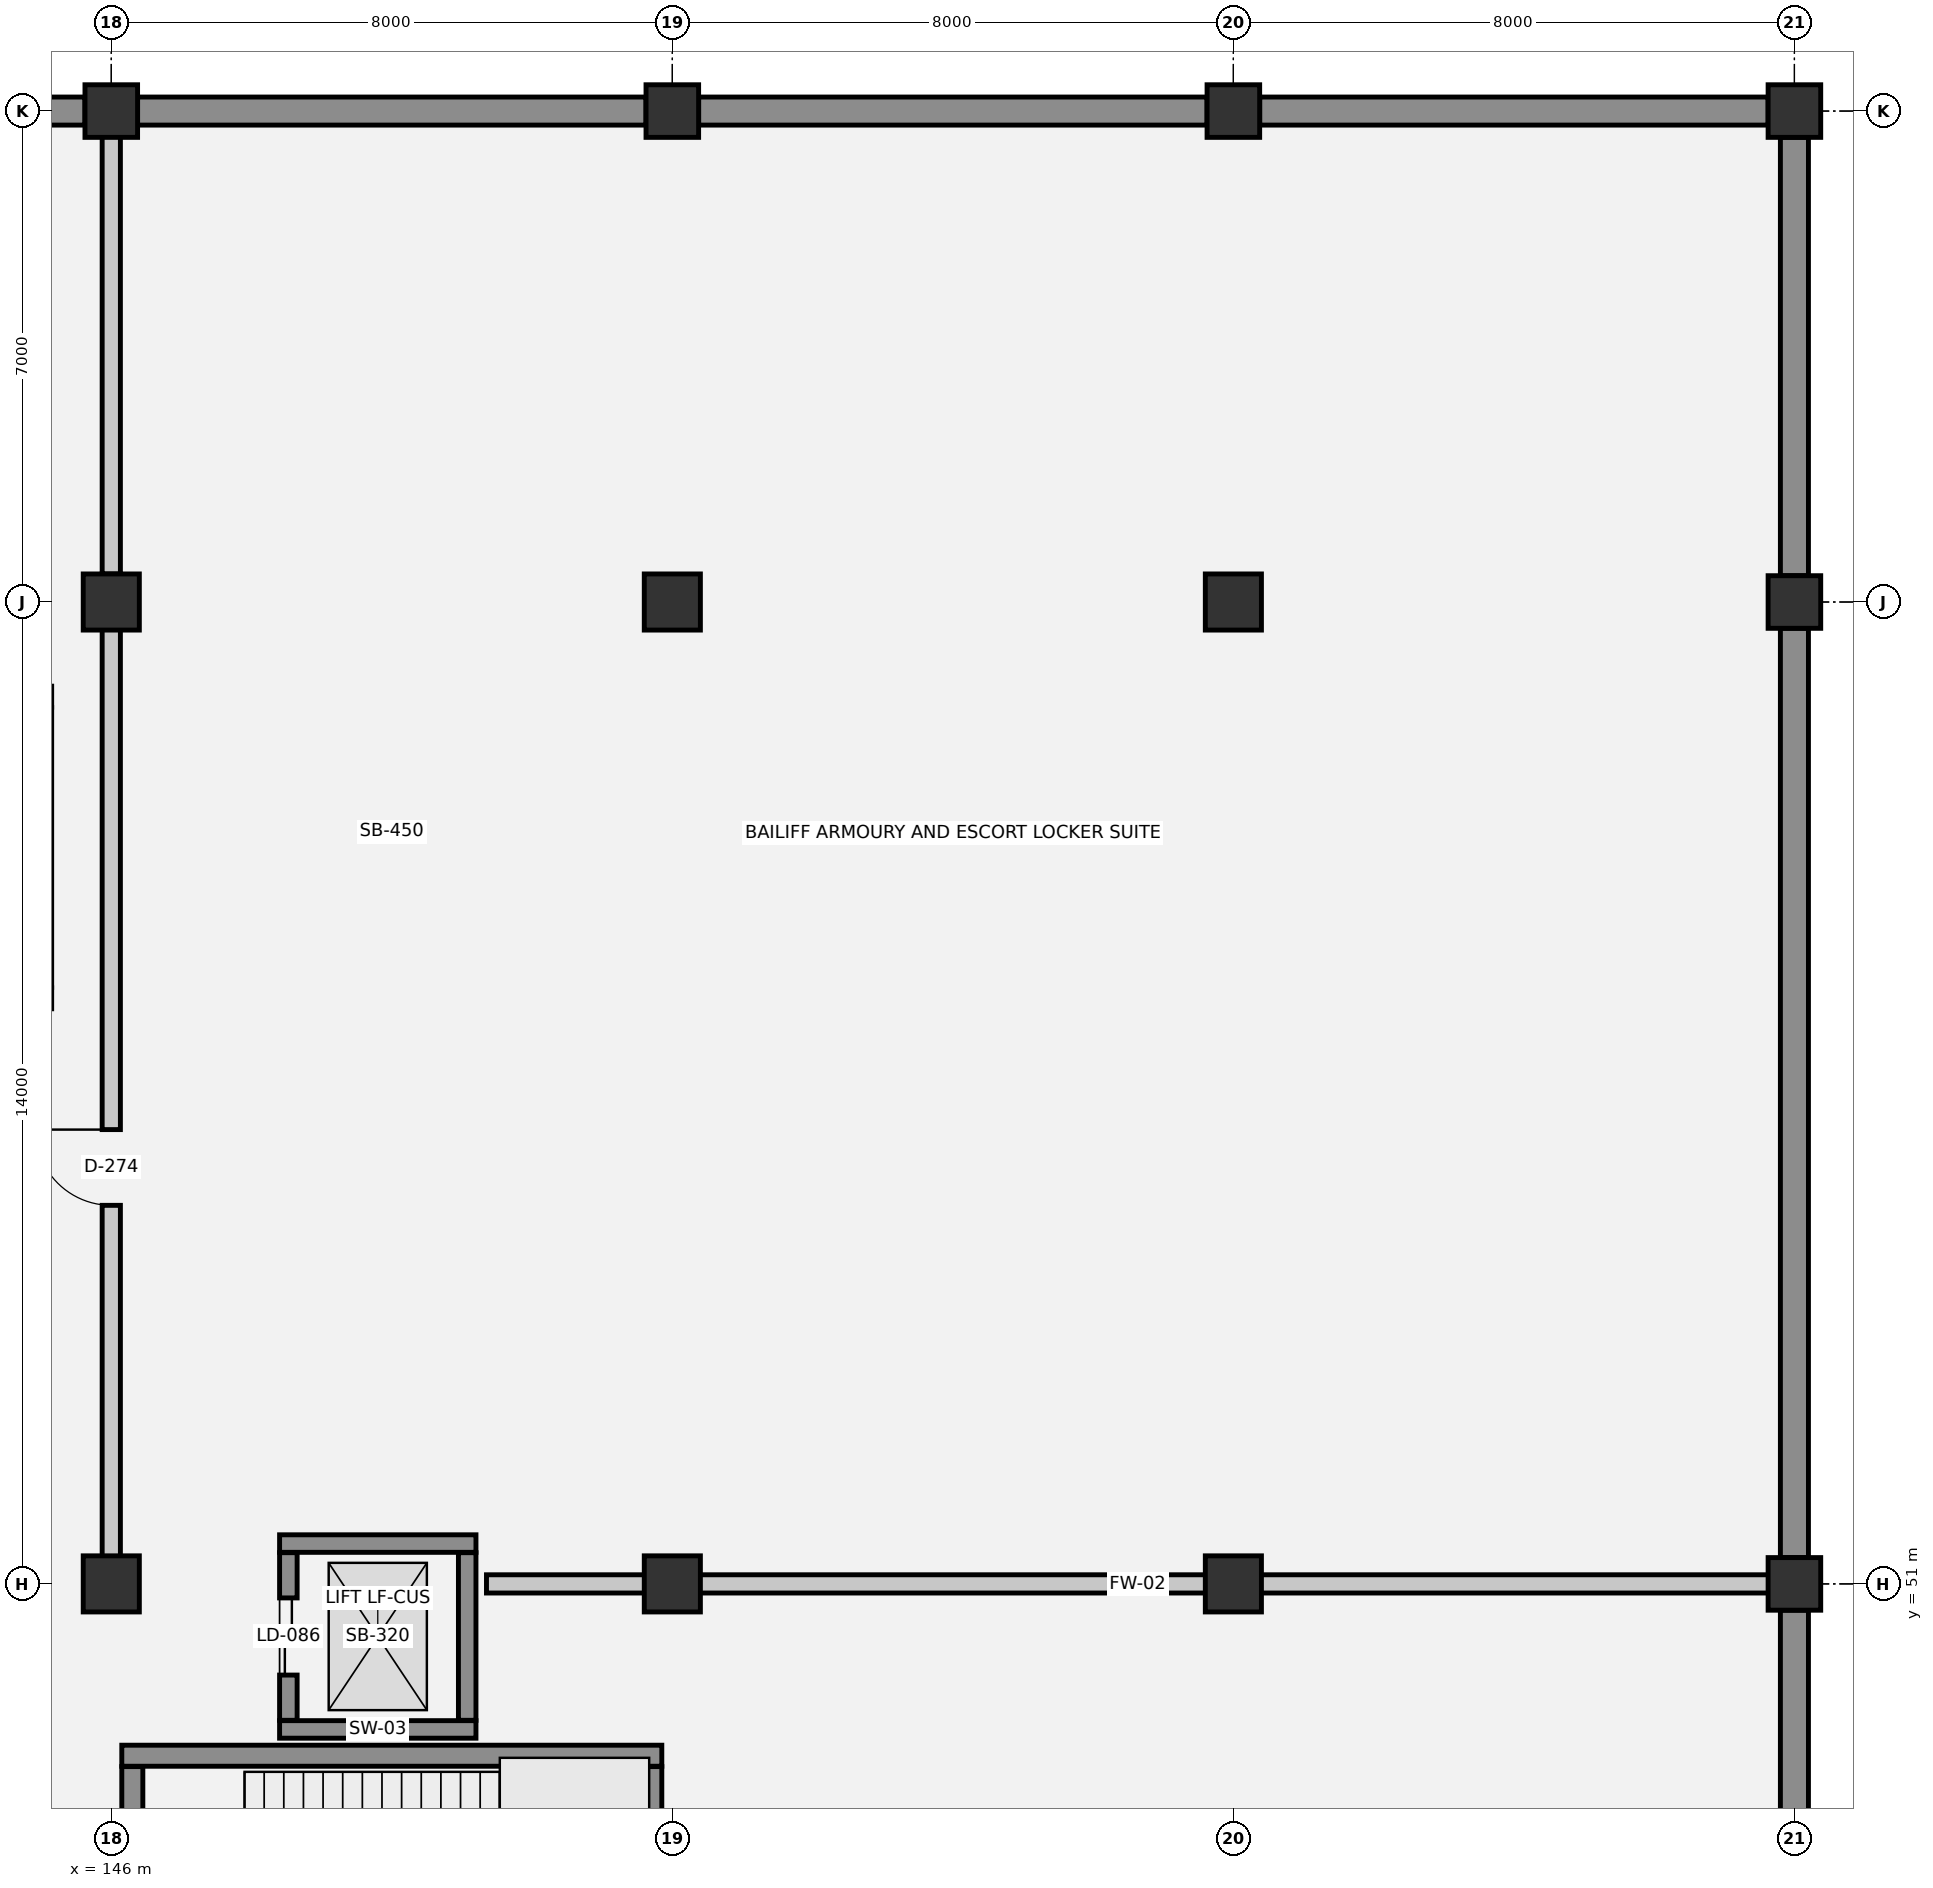
"""IFC4 building model, lengths in metres.
Left out: names, types, materials, properties, quantities, classifications, styles, units other than length and angle.
Written with IfcOpenShell. Run it as: python <this file> out.ifc"""

import sys

from ifc_helpers import new_model, si_unit, direction, frame, frame_2d, origin, origin_2d, place, context, subcontext, project, spatial, rectangle, extrude, element, fill, save


model = new_model("IFC4")
c1 = context("Model", 3, precision=1e-05, world=origin(), true_north=direction((0.0, 1.0)))
c2 = subcontext(c1, "Body", "Model", "MODEL_VIEW")
j1 = project(units=[si_unit("LENGTHUNIT", "METRE"), si_unit("PLANEANGLEUNIT", "RADIAN")], contexts=[c1])
p1 = place(None, origin())
s1 = spatial("IfcSite", under=j1, at=p1, CompositionType="ELEMENT")
p2 = place(p1, origin())
s2 = spatial("IfcBuilding", under=s1, at=p2, CompositionType="ELEMENT")
p3 = place(p2, frame((0.0, 0.0, -4.5)))
s3 = spatial("IfcBuildingStorey", under=s2, at=p3, CompositionType="ELEMENT", Elevation=-4.5)
for number, where, z_axis, x_axis in (
    (1, (146.0, 51.0, 0.0), (0.0, 0.0, 1.0), (1.0, 0.0, 0.0)),
    (2, (146.0, 65.0, 0.0), (0.0, 0.0, 1.0), (1.0, 0.0, 0.0)),
):
    element("IfcColumn", number, at=place(p3, frame(where, z_axis=z_axis, x_axis=x_axis)), inside=s3, PredefinedType="COLUMN", context=c2, shape_type="SweptSolid", body=[
        extrude(rectangle(XDim=0.8, YDim=0.8, at=origin_2d()), origin(), (0.0, 0.0, 1.0), 4.5),
    ])
p4 = place(p3, frame((146.0, 72.0, 0.0), z_axis=(0.0, 0.0, 1.0), x_axis=(1.0, 0.0, 0.0)))
e3 = element("IfcColumn", 3, at=p4, inside=s3, PredefinedType="COLUMN", context=c2, shape_type="SweptSolid", body=[
    extrude(rectangle(XDim=0.75, YDim=0.75, at=origin_2d()), origin(), (0.0, 0.0, 1.0), 4.5),
])
for number, where, z_axis, x_axis in (
    (4, (154.0, 51.0, 0.0), (0.0, 0.0, 1.0), (1.0, 0.0, 0.0)),
    (5, (154.0, 65.0, 0.0), (0.0, 0.0, 1.0), (1.0, 0.0, 0.0)),
):
    element("IfcColumn", number, at=place(p3, frame(where, z_axis=z_axis, x_axis=x_axis)), inside=s3, PredefinedType="COLUMN", context=c2, shape_type="SweptSolid", body=[
        extrude(rectangle(XDim=0.8, YDim=0.8, at=origin_2d()), origin(), (0.0, 0.0, 1.0), 4.5),
    ])
p5 = place(p3, frame((154.0, 72.0, 0.0), z_axis=(0.0, 0.0, 1.0), x_axis=(1.0, 0.0, 0.0)))
e6 = element("IfcColumn", 6, at=p5, inside=s3, PredefinedType="COLUMN", context=c2, shape_type="SweptSolid", body=[
    extrude(rectangle(XDim=0.75, YDim=0.75, at=origin_2d()), origin(), (0.0, 0.0, 1.0), 4.5),
])
for number, where, z_axis, x_axis in (
    (7, (162.0, 51.0, 0.0), (0.0, 0.0, 1.0), (1.0, 0.0, 0.0)),
    (8, (162.0, 65.0, 0.0), (0.0, 0.0, 1.0), (1.0, 0.0, 0.0)),
):
    element("IfcColumn", number, at=place(p3, frame(where, z_axis=z_axis, x_axis=x_axis)), inside=s3, PredefinedType="COLUMN", context=c2, shape_type="SweptSolid", body=[
        extrude(rectangle(XDim=0.8, YDim=0.8, at=origin_2d()), origin(), (0.0, 0.0, 1.0), 4.5),
    ])
for number, where, z_axis, x_axis in (
    (9, (162.0, 72.0, 0.0), (0.0, 0.0, 1.0), (1.0, 0.0, 0.0)),
    (10, (170.0, 51.0, 0.0), (0.0, 0.0, 1.0), (1.0, 0.0, 0.0)),
    (11, (170.0, 65.0, 0.0), (0.0, 0.0, 1.0), (1.0, 0.0, 0.0)),
    (12, (170.0, 72.0, 0.0), (0.0, 0.0, 1.0), (1.0, 0.0, 0.0)),
):
    element("IfcColumn", number, at=place(p3, frame(where, z_axis=z_axis, x_axis=x_axis)), inside=s3, PredefinedType="COLUMN", context=c2, shape_type="SweptSolid", body=[
        extrude(rectangle(XDim=0.75, YDim=0.75, at=origin_2d()), origin(), (0.0, 0.0, 1.0), 4.5),
    ])
for number, where, z_axis, x_axis in (
    (13, (138.375, 72.0, 0.0), (0.0, 0.0, 1.0), (1.0, 0.0, 0.0)),
    (14, (146.375, 72.0, 0.0), (0.0, 0.0, 1.0), (1.0, 0.0, 0.0)),
    (15, (154.375, 72.0, 0.0), (0.0, 0.0, 1.0), (1.0, 0.0, 0.0)),
    (16, (162.375, 72.0, 0.0), (0.0, 0.0, 1.0), (1.0, 0.0, 0.0)),
):
    element("IfcWall", number, at=place(p3, frame(where, z_axis=z_axis, x_axis=x_axis)), inside=s3, PredefinedType="STANDARD", context=c2, shape_type="SweptSolid", body=[
        extrude(rectangle(XDim=7.25, YDim=0.4, at=frame_2d((3.625, 0.0))), origin(), (0.0, 0.0, 1.0), 4.2),
    ])
p6 = place(p3, frame((170.0, 71.625, 0.0), z_axis=(0.0, 0.0, 1.0), x_axis=(0.0, -1.0, 0.0)))
e17 = element("IfcWall", 17, at=p6, inside=s3, PredefinedType="STANDARD", context=c2, shape_type="SweptSolid", body=[
    extrude(rectangle(XDim=6.25, YDim=0.4, at=frame_2d((3.125, 0.0))), origin(), (0.0, 0.0, 1.0), 4.2),
])
p7 = place(p3, frame((170.0, 64.625, 0.0), z_axis=(0.0, 0.0, 1.0), x_axis=(0.0, -1.0, 0.0)))
e18 = element("IfcWall", 18, at=p7, inside=s3, PredefinedType="STANDARD", context=c2, shape_type="SweptSolid", body=[
    extrude(rectangle(XDim=13.25, YDim=0.4, at=frame_2d((6.625, 0.0))), origin(), (0.0, 0.0, 1.0), 4.2),
])
p8 = place(p3, frame((170.0, 50.625, 0.0), z_axis=(0.0, 0.0, 1.0), x_axis=(0.0, -1.0, 0.0)))
e19 = element("IfcWall", 19, at=p8, inside=s3, PredefinedType="STANDARD", context=c2, shape_type="SweptSolid", body=[
    extrude(rectangle(XDim=6.25, YDim=0.4, at=frame_2d((3.125, 0.0))), origin(), (0.0, 0.0, 1.0), 4.2),
])
for number, where, z_axis, x_axis in (
    (20, (148.4, 48.925, 0.0), (0.0, 0.0, 1.0), (1.0, 0.0, 0.0)),
    (21, (151.2, 51.575, 0.0), (0.0, 0.0, 1.0), (-1.0, 0.0, 0.0)),
):
    element("IfcWall", number, at=place(p3, frame(where, z_axis=z_axis, x_axis=x_axis)), inside=s3, PredefinedType="SHEAR", context=c2, shape_type="SweptSolid", body=[
        extrude(rectangle(XDim=2.8, YDim=0.25, at=frame_2d((1.4, 0.0))), origin(), (0.0, 0.0, 1.0), 4.5),
    ])
p9 = place(p3, frame((148.525, 51.445, 0.0), z_axis=(0.0, 0.0, 1.0), x_axis=(0.0, -1.0, 0.0)))
e22 = element("IfcWall", 22, at=p9, inside=s3, PredefinedType="SHEAR", context=c2, shape_type="SweptSolid", body=[
    extrude(rectangle(XDim=2.39, YDim=0.25, at=frame_2d((1.195, 0.0))), origin(), (0.0, 0.0, 1.0), 4.5),
])
p10 = place(p9, frame((0.645, 0.0, 0.0)))
e23 = element("IfcOpeningElement", 23, at=p10, cuts=e22, PredefinedType="OPENING", context=c2, shape_type="SweptSolid", body=[
    extrude(rectangle(XDim=1.1, YDim=2.15, at=frame_2d((0.55, 1.075))), frame((0.0, 0.135, 0.0), z_axis=(0.0, -1.0, 0.0), x_axis=(1.0, 0.0, 0.0)), (0.0, 0.0, 1.0), 0.27),
])
p11 = place(p3, frame((151.075, 49.055, 0.0), z_axis=(0.0, 0.0, 1.0), x_axis=(0.0, 1.0, 0.0)))
e24 = element("IfcWall", 24, at=p11, inside=s3, PredefinedType="SHEAR", context=c2, shape_type="SweptSolid", body=[
    extrude(rectangle(XDim=2.39, YDim=0.25, at=frame_2d((1.195, 0.0))), origin(), (0.0, 0.0, 1.0), 4.5),
])
p12 = place(p3, frame((153.85, 48.55, 0.0), z_axis=(0.0, 0.0, 1.0), x_axis=(-1.0, 0.0, 0.0)))
e25 = element("IfcWall", 25, at=p12, inside=s3, PredefinedType="SHEAR", context=c2, shape_type="SweptSolid", body=[
    extrude(rectangle(XDim=7.7, YDim=0.3, at=frame_2d((3.85, 0.0))), origin(), (0.0, 0.0, 1.0), 4.2),
])
p13 = place(p3, frame((146.3, 48.395, 0.0), z_axis=(0.0, 0.0, 1.0), x_axis=(0.0, -1.0, 0.0)))
e26 = element("IfcWall", 26, at=p13, inside=s3, PredefinedType="SHEAR", context=c2, shape_type="SweptSolid", body=[
    extrude(rectangle(XDim=3.99, YDim=0.3, at=frame_2d((1.995, 0.0))), origin(), (0.0, 0.0, 1.0), 4.2),
])
p14 = place(p13, frame((1.37, 0.0, 0.0)))
e27 = element("IfcOpeningElement", 27, at=p14, cuts=e26, PredefinedType="OPENING", context=c2, shape_type="SweptSolid", body=[
    extrude(rectangle(XDim=1.25, YDim=2.15, at=frame_2d((0.625, 1.075))), frame((0.0, 0.16, 0.0), z_axis=(0.0, -1.0, 0.0), x_axis=(1.0, 0.0, 0.0)), (0.0, 0.0, 1.0), 0.32),
])
p15 = place(p3, frame((153.7, 44.405, 0.0), z_axis=(0.0, 0.0, 1.0), x_axis=(0.0, 1.0, 0.0)))
e28 = element("IfcWall", 28, at=p15, inside=s3, PredefinedType="SHEAR", context=c2, shape_type="SweptSolid", body=[
    extrude(rectangle(XDim=3.99, YDim=0.3, at=frame_2d((1.995, 0.0))), origin(), (0.0, 0.0, 1.0), 4.2),
])
p16 = place(p3, frame((151.35, 51.0, 0.0), z_axis=(0.0, 0.0, 1.0), x_axis=(1.0, 0.0, 0.0)))
e29 = element("IfcWall", 29, at=p16, inside=s3, PredefinedType="SOLIDWALL", context=c2, shape_type="SweptSolid", body=[
    extrude(rectangle(XDim=18.57, YDim=0.26, at=frame_2d((9.285, 0.0))), origin(), (0.0, 0.0, 1.0), 3.45),
])
p17 = place(p3, frame((146.0, 51.35, 0.0), z_axis=(0.0, 0.0, 1.0), x_axis=(0.0, 1.0, 0.0)))
e30 = element("IfcWall", 30, at=p17, inside=s3, PredefinedType="SOLIDWALL", context=c2, shape_type="SweptSolid", body=[
    extrude(rectangle(XDim=14.05, YDim=0.26, at=frame_2d((7.025, 0.0))), origin(), (0.0, 0.0, 1.0), 3.25),
])
p18 = place(p17, frame((5.048, 0.0, 0.0)))
e31 = element("IfcOpeningElement", 31, at=p18, cuts=e30, PredefinedType="OPENING", context=c2, shape_type="SweptSolid", body=[
    extrude(rectangle(XDim=1.08, YDim=2.1, at=frame_2d((0.54, 1.05))), frame((0.0, 0.14, 0.0), z_axis=(0.0, -1.0, 0.0), x_axis=(1.0, 0.0, 0.0)), (0.0, 0.0, 1.0), 0.28),
])
p19 = place(p3, frame((146.0, 65.4, 0.0), z_axis=(0.0, 0.0, 1.0), x_axis=(0.0, 1.0, 0.0)))
e32 = element("IfcWall", 32, at=p19, inside=s3, PredefinedType="SOLIDWALL", context=c2, shape_type="SweptSolid", body=[
    extrude(rectangle(XDim=6.52, YDim=0.26, at=frame_2d((3.26, 0.0))), origin(), (0.0, 0.0, 1.0), 3.55),
])
p20 = place(p10, origin())
e33 = element("IfcDoor", 33, at=p20, inside=s3, OperationType="DOUBLE_DOOR_SLIDING", PredefinedType="DOOR", context=c2, shape_type="SweptSolid", body=[
    extrude(rectangle(XDim=1.1, YDim=2.15, at=frame_2d((0.55, 1.075))), frame((0.0, 0.025, 0.0), z_axis=(0.0, -1.0, 0.0), x_axis=(1.0, 0.0, 0.0)), (0.0, 0.0, 1.0), 0.05),
])
fill(e23, e33)
p21 = place(p18, origin())
e34 = element("IfcDoor", 34, at=p21, inside=s3, OperationType="SINGLE_SWING_RIGHT", PredefinedType="DOOR", context=c2, shape_type="SweptSolid", body=[
    extrude(rectangle(XDim=1.08, YDim=2.1, at=frame_2d((0.54, 1.05))), frame((0.0, 0.025, 0.0), z_axis=(0.0, -1.0, 0.0), x_axis=(1.0, 0.0, 0.0)), (0.0, 0.0, 1.0), 0.05),
])
fill(e31, e34)
save(model, sys.argv[1])
